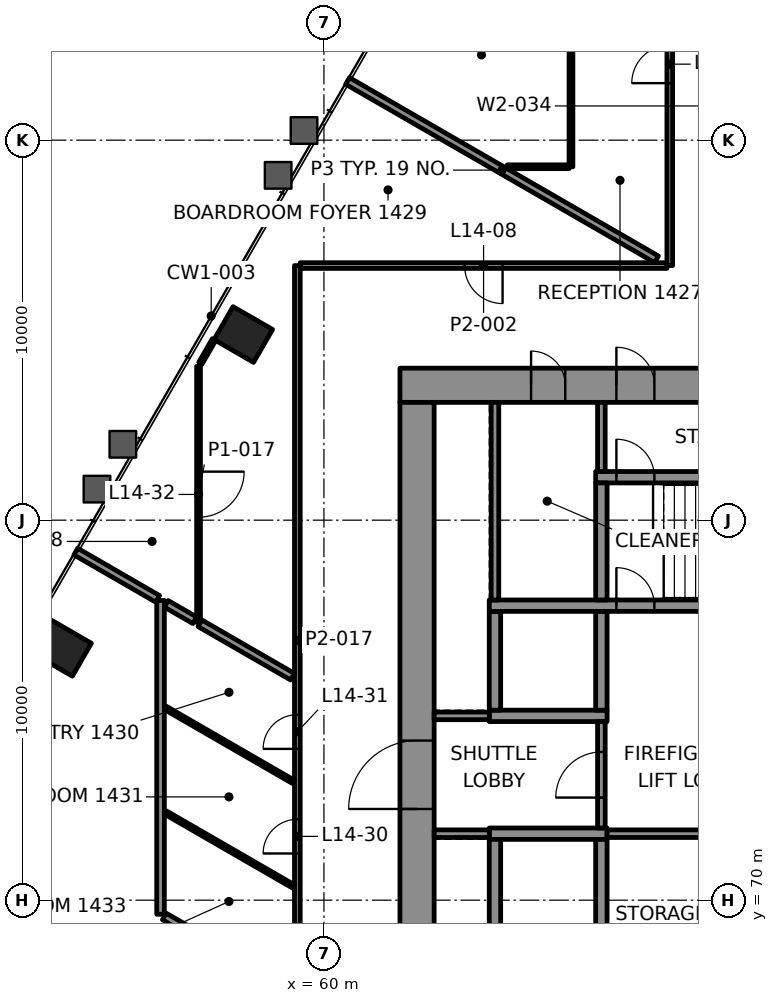
"""IFC4 building model, lengths in metres.
Left out: names, types, materials, properties, quantities, classifications, styles, units other than length and angle.
Written with IfcOpenShell. Run it as: python <this file> out.ifc"""

import sys

from ifc_helpers import new_model, si_unit, direction, frame, frame_2d, origin, origin_2d, place, context, subcontext, project, spatial, rectangle, extrude, element, fill, save


model = new_model("IFC4")
c1 = context("Model", 3, precision=1e-05, world=origin(), true_north=direction((0.0, 1.0)))
c2 = subcontext(c1, "Body", "Model", "MODEL_VIEW")
j1 = project(units=[si_unit("LENGTHUNIT", "METRE"), si_unit("PLANEANGLEUNIT", "RADIAN")], contexts=[c1])
p1 = place(None, origin())
s1 = spatial("IfcSite", under=j1, at=p1, CompositionType="ELEMENT")
p2 = place(p1, origin())
s2 = spatial("IfcBuilding", under=s1, at=p2, CompositionType="ELEMENT")
p3 = place(p2, frame((0.0, 0.0, 65.2)))
s3 = spatial("IfcBuildingStorey", under=s2, at=p3, CompositionType="ELEMENT", Elevation=65.2)
for number, where, z_axis, x_axis in (
    (1, (57.878, 84.885, -0.0), (0.0, 0.0, 1.0), (-0.5, -0.866, 0.0)),
    (2, (53.111, 76.628, -0.0), (0.0, 0.0, 1.0), (-0.5, -0.866, 0.0)),
):
    element("IfcColumn", number, at=place(p3, frame(where, z_axis=z_axis, x_axis=x_axis)), inside=s3, PredefinedType="COLUMN", context=c2, shape_type="SweptSolid", body=[
        extrude(rectangle(XDim=1.0, YDim=1.2, at=origin_2d()), origin(), (0.0, 0.0, 1.0), 4.2),
    ])
p4 = place(p3, frame((62.0, 83.55, 0.0), z_axis=(0.0, 0.0, 1.0), x_axis=(1.0, 0.0, 0.0)))
e3 = element("IfcWall", 3, at=p4, inside=s3, PredefinedType="SHEAR", context=c2, shape_type="SweptSolid", body=[
    extrude(rectangle(XDim=26.0, YDim=0.9, at=frame_2d((13.0, 0.0))), origin(), (0.0, 0.0, 1.0), 4.0),
])
p5 = place(p4, frame((5.695, 0.0, 0.0)))
e4 = element("IfcOpeningElement", 4, at=p5, cuts=e3, PredefinedType="OPENING", context=c2, shape_type="SweptSolid", body=[
    extrude(rectangle(XDim=1.0, YDim=2.1, at=frame_2d((0.5, 1.05))), frame((0.0, 0.46, 0.0), z_axis=(0.0, -1.0, 0.0), x_axis=(1.0, 0.0, 0.0)), (0.0, 0.0, 1.0), 0.92),
])
p6 = place(p4, frame((19.505, 0.0, 0.0)))
e5 = element("IfcOpeningElement", 5, at=p6, cuts=e3, PredefinedType="OPENING", context=c2, shape_type="SweptSolid", body=[
    extrude(rectangle(XDim=1.0, YDim=2.1, at=frame_2d((0.5, 1.05))), frame((0.0, 0.46, 0.0), z_axis=(0.0, -1.0, 0.0), x_axis=(1.0, 0.0, 0.0)), (0.0, 0.0, 1.0), 0.92),
])
p7 = place(p4, frame((3.45, 0.0, 0.0)))
e6 = element("IfcOpeningElement", 6, at=p7, cuts=e3, PredefinedType="OPENING", context=c2, shape_type="SweptSolid", body=[
    extrude(rectangle(XDim=0.9, YDim=2.1, at=frame_2d((0.45, 1.05))), frame((0.0, 0.46, 0.0), z_axis=(0.0, -1.0, 0.0), x_axis=(1.0, 0.0, 0.0)), (0.0, 0.0, 1.0), 0.92),
])
p8 = place(p4, frame((12.65, 0.0, 0.0)))
e7 = element("IfcOpeningElement", 7, at=p8, cuts=e3, PredefinedType="OPENING", context=c2, shape_type="SweptSolid", body=[
    extrude(rectangle(XDim=0.9, YDim=2.1, at=frame_2d((0.45, 1.05))), frame((0.0, 0.46, 0.0), z_axis=(0.0, -1.0, 0.0), x_axis=(1.0, 0.0, 0.0)), (0.0, 0.0, 1.0), 0.92),
])
p9 = place(p4, frame((22.55, 0.0, 0.0)))
e8 = element("IfcOpeningElement", 8, at=p9, cuts=e3, PredefinedType="OPENING", context=c2, shape_type="SweptSolid", body=[
    extrude(rectangle(XDim=0.9, YDim=2.1, at=frame_2d((0.45, 1.05))), frame((0.0, 0.46, 0.0), z_axis=(0.0, -1.0, 0.0), x_axis=(1.0, 0.0, 0.0)), (0.0, 0.0, 1.0), 0.92),
])
p10 = place(p3, frame((62.45, 66.9, 0.0), z_axis=(0.0, 0.0, 1.0), x_axis=(0.0, 1.0, 0.0)))
e9 = element("IfcWall", 9, at=p10, inside=s3, PredefinedType="SHEAR", context=c2, shape_type="SweptSolid", body=[
    extrude(rectangle(XDim=16.2, YDim=0.9, at=frame_2d((8.1, 0.0))), origin(), (0.0, 0.0, 1.0), 4.0),
])
p11 = place(p10, frame((5.5, 0.0, 0.0)))
e10 = element("IfcOpeningElement", 10, at=p11, cuts=e9, PredefinedType="OPENING", context=c2, shape_type="SweptSolid", body=[
    extrude(rectangle(XDim=1.8, YDim=2.1, at=frame_2d((0.9, 1.05))), frame((0.0, 0.46, 0.0), z_axis=(0.0, -1.0, 0.0), x_axis=(1.0, 0.0, 0.0)), (0.0, 0.0, 1.0), 0.92),
])
for number, where, z_axis, x_axis in (
    (11, (64.35, 71.75, 0.0), (0.0, 0.0, 1.0), (1.0, 0.0, 0.0)),
    (12, (64.35, 74.85, 0.0), (0.0, 0.0, 1.0), (1.0, 0.0, 0.0)),
):
    element("IfcWall", number, at=place(p3, frame(where, z_axis=z_axis, x_axis=x_axis)), inside=s3, PredefinedType="SHEAR", context=c2, shape_type="SweptSolid", body=[
        extrude(rectangle(XDim=3.1, YDim=0.3, at=frame_2d((1.55, 0.0))), origin(), (0.0, 0.0, 1.0), 4.0),
    ])
for number, where, z_axis, x_axis in (
    (13, (64.5, 69.0, 0.0), (0.0, 0.0, 1.0), (0.0, 1.0, 0.0)),
    (14, (64.5, 75.0, 0.0), (0.0, 0.0, 1.0), (0.0, 1.0, 0.0)),
    (15, (67.3, 69.0, 0.0), (0.0, 0.0, 1.0), (0.0, 1.0, 0.0)),
    (16, (67.3, 75.0, 0.0), (0.0, 0.0, 1.0), (0.0, 1.0, 0.0)),
):
    element("IfcWall", number, at=place(p3, frame(where, z_axis=z_axis, x_axis=x_axis)), inside=s3, PredefinedType="SHEAR", context=c2, shape_type="SweptSolid", body=[
        extrude(rectangle(XDim=2.6, YDim=0.3, at=frame_2d((1.3, 0.0))), origin(), (0.0, 0.0, 1.0), 4.0),
    ])
p12 = place(p3, frame((64.35, 77.75, 0.0), z_axis=(0.0, 0.0, 1.0), x_axis=(1.0, 0.0, 0.0)))
e17 = element("IfcWall", 17, at=p12, inside=s3, PredefinedType="SHEAR", context=c2, shape_type="SweptSolid", body=[
    extrude(rectangle(XDim=22.75, YDim=0.3, at=frame_2d((11.375, 0.0))), origin(), (0.0, 0.0, 1.0), 4.0),
])
p13 = place(p12, frame((3.345, 0.0, 0.0)))
e18 = element("IfcOpeningElement", 18, at=p13, cuts=e17, PredefinedType="OPENING", context=c2, shape_type="SweptSolid", body=[
    extrude(rectangle(XDim=1.0, YDim=2.1, at=frame_2d((0.5, 1.05))), frame((0.0, 0.16, 0.0), z_axis=(0.0, -1.0, 0.0), x_axis=(1.0, 0.0, 0.0)), (0.0, 0.0, 1.0), 0.32),
])
p14 = place(p3, frame((67.15, 81.13, 0.0), z_axis=(0.0, 0.0, 1.0), x_axis=(1.0, 0.0, 0.0)))
e19 = element("IfcWall", 19, at=p14, inside=s3, PredefinedType="SHEAR", context=c2, shape_type="SweptSolid", body=[
    extrude(rectangle(XDim=6.91, YDim=0.3, at=frame_2d((3.455, 0.0))), origin(), (0.0, 0.0, 1.0), 4.0),
])
p15 = place(p14, frame((0.545, 0.0, 0.0)))
e20 = element("IfcOpeningElement", 20, at=p15, cuts=e19, PredefinedType="OPENING", context=c2, shape_type="SweptSolid", body=[
    extrude(rectangle(XDim=1.0, YDim=2.1, at=frame_2d((0.5, 1.05))), frame((0.0, 0.16, 0.0), z_axis=(0.0, -1.0, 0.0), x_axis=(1.0, 0.0, 0.0)), (0.0, 0.0, 1.0), 0.32),
])
p16 = place(p3, frame((67.3, 77.9, 0.0), z_axis=(0.0, 0.0, 1.0), x_axis=(0.0, 1.0, 0.0)))
e21 = element("IfcWall", 21, at=p16, inside=s3, PredefinedType="SHEAR", context=c2, shape_type="SweptSolid", body=[
    extrude(rectangle(XDim=3.08, YDim=0.3, at=frame_2d((1.54, 0.0))), origin(), (0.0, 0.0, 1.0), 4.0),
])
p17 = place(p3, frame((69.025, 86.7, 0.0), z_axis=(0.0, 0.0, 1.0), x_axis=(-1.0, 0.0, 0.0)))
e22 = element("IfcWall", 22, at=p17, inside=s3, PredefinedType="PARTITIONING", context=c2, shape_type="SweptSolid", body=[
    extrude(rectangle(XDim=9.649, YDim=0.15, at=frame_2d((4.825, 0.0))), origin(), (0.0, 0.0, 1.0), 3.4),
])
p18 = place(p17, frame((4.325, 0.0, 0.0)))
e23 = element("IfcOpeningElement", 23, at=p18, cuts=e22, PredefinedType="OPENING", context=c2, shape_type="SweptSolid", body=[
    extrude(rectangle(XDim=1.0, YDim=2.1, at=frame_2d((0.5, 1.05))), frame((0.0, 0.085, 0.0), z_axis=(0.0, -1.0, 0.0), x_axis=(1.0, 0.0, 0.0)), (0.0, 0.0, 1.0), 0.17),
])
p19 = place(p3, frame((64.823, 89.3, 0.0), z_axis=(0.0, 0.0, 1.0), x_axis=(1.0, 0.0, 0.0)))
e24 = element("IfcWall", 24, at=p19, inside=s3, PredefinedType="PARTITIONING", context=c2, shape_type="SweptSolid", body=[
    extrude(rectangle(XDim=1.627, YDim=0.1, at=frame_2d((0.813, 0.0))), origin(), (0.0, 0.0, 1.0), 3.4),
])
p20 = place(p3, frame((56.75, 84.132, 0.0), z_axis=(0.0, 0.0, 1.0), x_axis=(0.49987987985, 0.866094744079, 0.0)))
e25 = element("IfcWall", 25, at=p20, inside=s3, PredefinedType="PARTITIONING", context=c2, shape_type="SweptSolid", body=[
    extrude(rectangle(XDim=0.716, YDim=0.1, at=frame_2d((0.358, 0.0))), origin(), (0.0, 0.0, 1.0), 3.4),
])
p21 = place(p3, frame((69.1, 86.7, 0.0), z_axis=(0.0, 0.0, 1.0), x_axis=(0.0, 1.0, 0.0)))
e26 = element("IfcWall", 26, at=p21, inside=s3, PredefinedType="PARTITIONING", context=c2, shape_type="SweptSolid", body=[
    extrude(rectangle(XDim=10.6, YDim=0.15, at=frame_2d((5.3, 0.0))), origin(), (0.0, 0.0, 1.0), 3.4),
])
p22 = place(p21, frame((4.8, 0.0, 0.0)))
e27 = element("IfcOpeningElement", 27, at=p22, cuts=e26, PredefinedType="OPENING", context=c2, shape_type="SweptSolid", body=[
    extrude(rectangle(XDim=1.0, YDim=2.1, at=frame_2d((0.5, 1.05))), frame((0.0, 0.085, 0.0), z_axis=(0.0, -1.0, 0.0), x_axis=(1.0, 0.0, 0.0)), (0.0, 0.0, 1.0), 0.17),
])
p23 = place(p3, frame((66.5, 99.899, 0.0), z_axis=(0.0, 0.0, 1.0), x_axis=(0.0, -1.0, 0.0)))
e28 = element("IfcWall", 28, at=p23, inside=s3, PredefinedType="PARTITIONING", context=c2, shape_type="SweptSolid", body=[
    extrude(rectangle(XDim=10.599, YDim=0.1, at=frame_2d((5.3, 0.0))), origin(), (0.0, 0.0, 1.0), 3.165),
])
p24 = place(p23, frame((5.062, 0.0, 0.0)))
e29 = element("IfcOpeningElement", 29, at=p24, cuts=e28, PredefinedType="OPENING", context=c2, shape_type="SweptSolid", body=[
    extrude(rectangle(XDim=1.0, YDim=2.1, at=frame_2d((0.5, 1.05))), frame((0.0, 0.06, 0.0), z_axis=(0.0, -1.0, 0.0), x_axis=(1.0, 0.0, 0.0)), (0.0, 0.0, 1.0), 0.12),
])
p25 = place(p3, frame((59.3, 66.975, 0.0), z_axis=(0.0, 0.0, 1.0), x_axis=(0.0, 1.0, 0.0)))
e30 = element("IfcWall", 30, at=p25, inside=s3, PredefinedType="PARTITIONING", context=c2, shape_type="SweptSolid", body=[
    extrude(rectangle(XDim=19.725, YDim=0.15, at=frame_2d((9.862, 0.0))), origin(), (0.0, 0.0, 1.0), 3.4),
])
p26 = place(p25, frame((1.502, 0.0, 0.0)))
e31 = element("IfcOpeningElement", 31, at=p26, cuts=e30, PredefinedType="OPENING", context=c2, shape_type="SweptSolid", body=[
    extrude(rectangle(XDim=0.9, YDim=2.1, at=frame_2d((0.45, 1.05))), frame((0.0, 0.085, 0.0), z_axis=(0.0, -1.0, 0.0), x_axis=(1.0, 0.0, 0.0)), (0.0, 0.0, 1.0), 0.17),
])
p27 = place(p25, frame((4.254, 0.0, 0.0)))
e32 = element("IfcOpeningElement", 32, at=p27, cuts=e30, PredefinedType="OPENING", context=c2, shape_type="SweptSolid", body=[
    extrude(rectangle(XDim=0.9, YDim=2.1, at=frame_2d((0.45, 1.05))), frame((0.0, 0.085, 0.0), z_axis=(0.0, -1.0, 0.0), x_axis=(1.0, 0.0, 0.0)), (0.0, 0.0, 1.0), 0.17),
])
p28 = place(p25, frame((7.007, 0.0, 0.0)))
e33 = element("IfcOpeningElement", 33, at=p28, cuts=e30, PredefinedType="OPENING", context=c2, shape_type="SweptSolid", body=[
    extrude(rectangle(XDim=0.9, YDim=2.1, at=frame_2d((0.45, 1.05))), frame((0.0, 0.085, 0.0), z_axis=(0.0, -1.0, 0.0), x_axis=(1.0, 0.0, 0.0)), (0.0, 0.0, 1.0), 0.17),
])
p29 = place(p3, frame((56.7, 84.046, 0.0), z_axis=(0.0, 0.0, 1.0), x_axis=(0.0, -1.0, 0.0)))
e34 = element("IfcWall", 34, at=p29, inside=s3, PredefinedType="PARTITIONING", context=c2, shape_type="SweptSolid", body=[
    extrude(rectangle(XDim=6.737, YDim=0.1, at=frame_2d((3.369, 0.0))), origin(), (0.0, 0.0, 1.0), 3.165),
])
p30 = place(p29, frame((2.769, 0.0, 0.0)))
e35 = element("IfcOpeningElement", 35, at=p30, cuts=e34, PredefinedType="OPENING", context=c2, shape_type="SweptSolid", body=[
    extrude(rectangle(XDim=1.2, YDim=2.1, at=frame_2d((0.6, 1.05))), frame((0.0, 0.06, 0.0), z_axis=(0.0, -1.0, 0.0), x_axis=(1.0, 0.0, 0.0)), (0.0, 0.0, 1.0), 0.12),
])
p31 = place(p3, frame((55.7, 69.63, 0.0), z_axis=(0.0, 0.0, 1.0), x_axis=(0.0, 1.0, 0.0)))
e36 = element("IfcWall", 36, at=p31, inside=s3, PredefinedType="PARTITIONING", context=c2, shape_type="SweptSolid", body=[
    extrude(rectangle(XDim=8.256, YDim=0.2, at=frame_2d((4.128, 0.0))), origin(), (0.0, 0.0, 1.0), 3.4),
])
p32 = place(p3, frame((68.751, 86.865, 0.0), z_axis=(0.0, 0.0, 1.0), x_axis=(-0.8660257632, 0.499999377474, 0.0)))
e37 = element("IfcWall", 37, at=p32, inside=s3, PredefinedType="PARTITIONING", context=c2, shape_type="SweptSolid", body=[
    extrude(rectangle(XDim=9.387, YDim=0.2, at=frame_2d((4.693, 0.0))), origin(), (0.0, 0.0, 1.0), 3.165),
])
p33 = place(p3, frame((59.173, 75.881, 0.0), z_axis=(0.0, 0.0, 1.0), x_axis=(-0.866049697453, 0.499957919771, 0.0)))
e38 = element("IfcWall", 38, at=p33, inside=s3, PredefinedType="PARTITIONING", context=c2, shape_type="SweptSolid", body=[
    extrude(rectangle(XDim=2.812, YDim=0.2, at=frame_2d((1.406, 0.0))), origin(), (0.0, 0.0, 1.0), 3.4),
])
p34 = place(p3, frame((59.199, 73.113, 0.0), z_axis=(0.0, 0.0, 1.0), x_axis=(-0.866016482536, 0.500015451737, 0.0)))
e39 = element("IfcWall", 39, at=p34, inside=s3, PredefinedType="PARTITIONING", context=c2, shape_type="SweptSolid", body=[
    extrude(rectangle(XDim=3.895, YDim=0.1, at=frame_2d((1.948, 0.0))), origin(), (0.0, 0.0, 1.0), 3.4),
])
p35 = place(p3, frame((59.199, 70.361, 0.0), z_axis=(0.0, 0.0, 1.0), x_axis=(-0.866043624834, 0.499968438888, 0.0)))
e40 = element("IfcWall", 40, at=p35, inside=s3, PredefinedType="PARTITIONING", context=c2, shape_type="SweptSolid", body=[
    extrude(rectangle(XDim=3.895, YDim=0.1, at=frame_2d((1.947, 0.0))), origin(), (0.0, 0.0, 1.0), 3.4),
])
p36 = place(p3, frame((59.173, 67.623, 0.0), z_axis=(0.0, 0.0, 1.0), x_axis=(-0.866000809756, 0.500042595688, 0.0)))
e41 = element("IfcWall", 41, at=p36, inside=s3, PredefinedType="PARTITIONING", context=c2, shape_type="SweptSolid", body=[
    extrude(rectangle(XDim=3.895, YDim=0.2, at=frame_2d((1.947, 0.0))), origin(), (0.0, 0.0, 1.0), 3.4),
])
p37 = place(p3, frame((56.6, 77.366, 0.0), z_axis=(0.0, 0.0, 1.0), x_axis=(-0.866101087359, 0.499868889286, 0.0)))
e42 = element("IfcWall", 42, at=p37, inside=s3, PredefinedType="PARTITIONING", context=c2, shape_type="SweptSolid", body=[
    extrude(rectangle(XDim=0.866, YDim=0.2, at=frame_2d((0.433, 0.0))), origin(), (0.0, 0.0, 1.0), 3.4),
])
p38 = place(p3, frame((55.625, 77.929, 0.0), z_axis=(0.0, 0.0, 1.0), x_axis=(-0.86602376425, 0.500002839747, 0.0)))
e43 = element("IfcWall", 43, at=p38, inside=s3, PredefinedType="PARTITIONING", context=c2, shape_type="SweptSolid", body=[
    extrude(rectangle(XDim=2.487, YDim=0.2, at=frame_2d((1.244, 0.0))), origin(), (0.0, 0.0, 1.0), 3.165),
])
p39 = place(p3, frame((62.9, 71.75, 0.0), z_axis=(0.0, 0.0, 1.0), x_axis=(1.0, 0.0, 0.0)))
e44 = element("IfcWall", 44, at=p39, inside=s3, PredefinedType="PARTITIONING", context=c2, shape_type="SweptSolid", body=[
    extrude(rectangle(XDim=1.45, YDim=0.2, at=frame_2d((0.725, 0.0))), origin(), (0.0, 0.0, 1.0), 4.0),
])
p40 = place(p3, frame((67.45, 71.75, 0.0), z_axis=(0.0, 0.0, 1.0), x_axis=(1.0, 0.0, 0.0)))
e45 = element("IfcWall", 45, at=p40, inside=s3, PredefinedType="PARTITIONING", context=c2, shape_type="SweptSolid", body=[
    extrude(rectangle(XDim=2.85, YDim=0.2, at=frame_2d((1.425, 0.0))), origin(), (0.0, 0.0, 1.0), 4.0),
])
p41 = place(p3, frame((62.9, 74.85, 0.0), z_axis=(0.0, 0.0, 1.0), x_axis=(1.0, 0.0, 0.0)))
e46 = element("IfcWall", 46, at=p41, inside=s3, PredefinedType="PARTITIONING", context=c2, shape_type="SweptSolid", body=[
    extrude(rectangle(XDim=1.45, YDim=0.2, at=frame_2d((0.725, 0.0))), origin(), (0.0, 0.0, 1.0), 4.0),
])
p42 = place(p3, frame((64.5, 77.9, 0.0), z_axis=(0.0, 0.0, 1.0), x_axis=(0.0, 1.0, 0.0)))
e47 = element("IfcWall", 47, at=p42, inside=s3, PredefinedType="PARTITIONING", context=c2, shape_type="SweptSolid", body=[
    extrude(rectangle(XDim=5.2, YDim=0.2, at=frame_2d((2.6, 0.0))), origin(), (0.0, 0.0, 1.0), 4.0),
])
p43 = place(p3, frame((67.3, 71.9, 0.0), z_axis=(0.0, 0.0, 1.0), x_axis=(0.0, 1.0, 0.0)))
e48 = element("IfcWall", 48, at=p43, inside=s3, PredefinedType="PARTITIONING", context=c2, shape_type="SweptSolid", body=[
    extrude(rectangle(XDim=2.8, YDim=0.2, at=frame_2d((1.4, 0.0))), origin(), (0.0, 0.0, 1.0), 4.0),
])
p44 = place(p43, frame((0.8, 0.0, 0.0)))
e49 = element("IfcOpeningElement", 49, at=p44, cuts=e48, PredefinedType="OPENING", context=c2, shape_type="SweptSolid", body=[
    extrude(rectangle(XDim=1.2, YDim=2.1, at=frame_2d((0.6, 1.05))), frame((0.0, 0.11, 0.0), z_axis=(0.0, -1.0, 0.0), x_axis=(1.0, 0.0, 0.0)), (0.0, 0.0, 1.0), 0.22),
])
p45 = place(p3, frame((67.3, 81.28, 0.0), z_axis=(0.0, 0.0, 1.0), x_axis=(0.0, 1.0, 0.0)))
e50 = element("IfcWall", 50, at=p45, inside=s3, PredefinedType="PARTITIONING", context=c2, shape_type="SweptSolid", body=[
    extrude(rectangle(XDim=1.82, YDim=0.2, at=frame_2d((0.91, 0.0))), origin(), (0.0, 0.0, 1.0), 4.0),
])
p46 = place(p18, origin())
e51 = element("IfcDoor", 51, at=p46, inside=s3, OperationType="SINGLE_SWING_LEFT", PredefinedType="DOOR", context=c2, shape_type="SweptSolid", body=[
    extrude(rectangle(XDim=1.0, YDim=2.1, at=frame_2d((0.5, 1.05))), frame((0.0, 0.025, 0.0), z_axis=(0.0, -1.0, 0.0), x_axis=(1.0, 0.0, 0.0)), (0.0, 0.0, 1.0), 0.05),
])
fill(e23, e51)
p47 = place(p22, origin())
e52 = element("IfcDoor", 52, at=p47, inside=s3, OperationType="SINGLE_SWING_RIGHT", PredefinedType="DOOR", context=c2, shape_type="SweptSolid", body=[
    extrude(rectangle(XDim=1.0, YDim=2.1, at=frame_2d((0.5, 1.05))), frame((0.0, 0.025, 0.0), z_axis=(0.0, -1.0, 0.0), x_axis=(1.0, 0.0, 0.0)), (0.0, 0.0, 1.0), 0.05),
])
fill(e27, e52)
p48 = place(p27, origin())
e53 = element("IfcDoor", 53, at=p48, inside=s3, OperationType="SINGLE_SWING_RIGHT", PredefinedType="DOOR", context=c2, shape_type="SweptSolid", body=[
    extrude(rectangle(XDim=0.9, YDim=2.1, at=frame_2d((0.45, 1.05))), frame((0.0, 0.025, 0.0), z_axis=(0.0, -1.0, 0.0), x_axis=(1.0, 0.0, 0.0)), (0.0, 0.0, 1.0), 0.05),
])
fill(e32, e53)
p49 = place(p28, origin())
e54 = element("IfcDoor", 54, at=p49, inside=s3, OperationType="SINGLE_SWING_LEFT", PredefinedType="DOOR", context=c2, shape_type="SweptSolid", body=[
    extrude(rectangle(XDim=0.9, YDim=2.1, at=frame_2d((0.45, 1.05))), frame((0.0, 0.025, 0.0), z_axis=(0.0, -1.0, 0.0), x_axis=(1.0, 0.0, 0.0)), (0.0, 0.0, 1.0), 0.05),
])
fill(e33, e54)
p50 = place(p30, origin())
e55 = element("IfcDoor", 55, at=p50, inside=s3, OperationType="DOUBLE_DOOR_SINGLE_SWING", PredefinedType="DOOR", context=c2, shape_type="SweptSolid", body=[
    extrude(rectangle(XDim=1.2, YDim=2.1, at=frame_2d((0.6, 1.05))), frame((0.0, 0.025, 0.0), z_axis=(0.0, -1.0, 0.0), x_axis=(1.0, 0.0, 0.0)), (0.0, 0.0, 1.0), 0.05),
])
fill(e35, e55)
p51 = place(p13, origin())
e56 = element("IfcDoor", 56, at=p51, inside=s3, OperationType="SINGLE_SWING_LEFT", PredefinedType="DOOR", context=c2, shape_type="SweptSolid", body=[
    extrude(rectangle(XDim=1.0, YDim=2.1, at=frame_2d((0.5, 1.05))), frame((0.0, 0.025, 0.0), z_axis=(0.0, -1.0, 0.0), x_axis=(1.0, 0.0, 0.0)), (0.0, 0.0, 1.0), 0.05),
])
fill(e18, e56)
p52 = place(p15, origin())
e57 = element("IfcDoor", 57, at=p52, inside=s3, OperationType="SINGLE_SWING_RIGHT", PredefinedType="DOOR", context=c2, shape_type="SweptSolid", body=[
    extrude(rectangle(XDim=1.0, YDim=2.1, at=frame_2d((0.5, 1.05))), frame((0.0, 0.025, 0.0), z_axis=(0.0, -1.0, 0.0), x_axis=(1.0, 0.0, 0.0)), (0.0, 0.0, 1.0), 0.05),
])
fill(e20, e57)
p53 = place(p5, origin())
e58 = element("IfcDoor", 58, at=p53, inside=s3, OperationType="SINGLE_SWING_LEFT", PredefinedType="DOOR", context=c2, shape_type="SweptSolid", body=[
    extrude(rectangle(XDim=1.0, YDim=2.1, at=frame_2d((0.5, 1.05))), frame((0.0, 0.17, 0.0), z_axis=(0.0, -1.0, 0.0), x_axis=(1.0, 0.0, 0.0)), (0.0, 0.0, 1.0), 0.34),
])
fill(e4, e58)
p54 = place(p44, origin())
e59 = element("IfcDoor", 59, at=p54, inside=s3, OperationType="SINGLE_SWING_RIGHT", PredefinedType="DOOR", context=c2, shape_type="SweptSolid", body=[
    extrude(rectangle(XDim=1.2, YDim=2.1, at=frame_2d((0.6, 1.05))), frame((0.0, 0.025, 0.0), z_axis=(0.0, -1.0, 0.0), x_axis=(1.0, 0.0, 0.0)), (0.0, 0.0, 1.0), 0.05),
])
fill(e49, e59)
p55 = place(p11, origin())
e60 = element("IfcDoor", 60, at=p55, inside=s3, OperationType="SINGLE_SWING_LEFT", PredefinedType="DOOR", context=c2, shape_type="SweptSolid", body=[
    extrude(rectangle(XDim=1.8, YDim=2.1, at=frame_2d((0.9, 1.05))), frame((0.0, 0.17, 0.0), z_axis=(0.0, -1.0, 0.0), x_axis=(1.0, 0.0, 0.0)), (0.0, 0.0, 1.0), 0.34),
])
fill(e10, e60)
p56 = place(p7, origin())
e61 = element("IfcDoor", 61, at=p56, inside=s3, OperationType="SINGLE_SWING_RIGHT", PredefinedType="DOOR", context=c2, shape_type="SweptSolid", body=[
    extrude(rectangle(XDim=0.9, YDim=2.1, at=frame_2d((0.45, 1.05))), frame((0.0, 0.17, 0.0), z_axis=(0.0, -1.0, 0.0), x_axis=(1.0, 0.0, 0.0)), (0.0, 0.0, 1.0), 0.34),
])
fill(e6, e61)
save(model, sys.argv[1])
